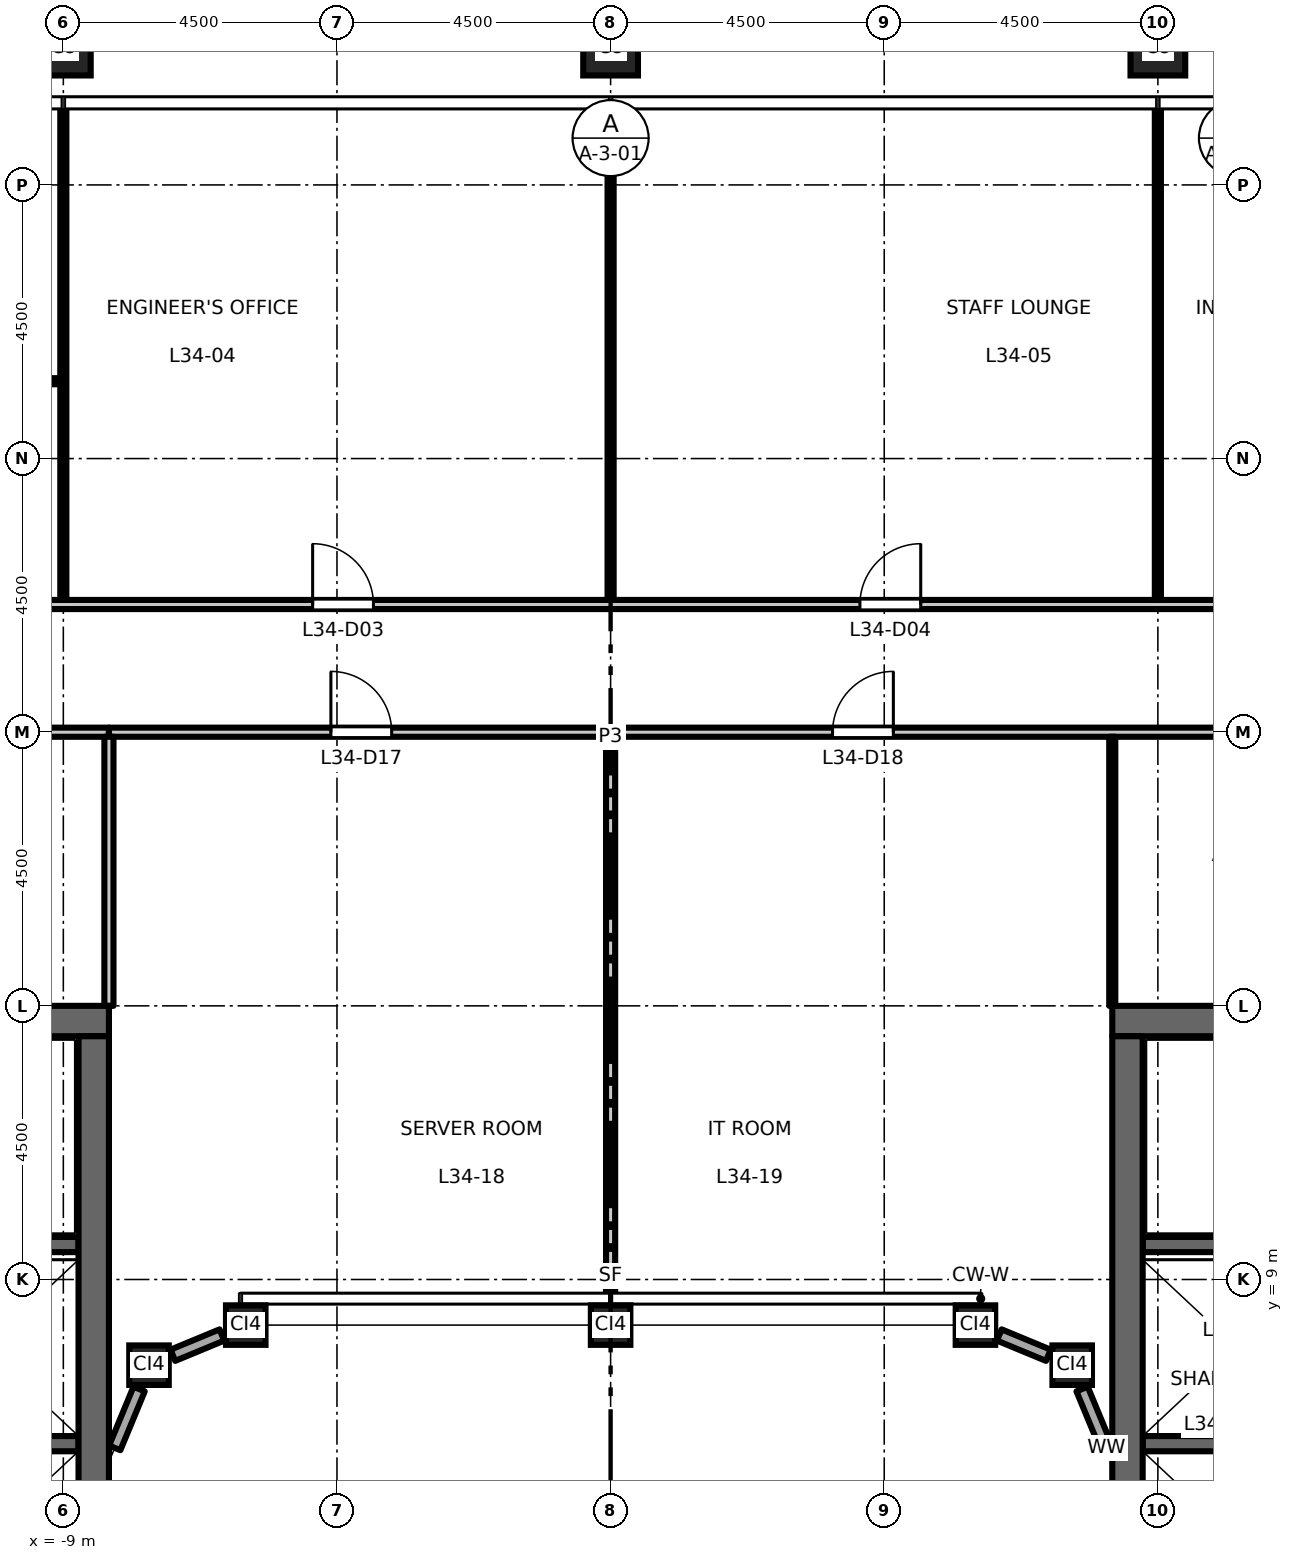
"""IFC4 building model, lengths in metres.
Left out: names, types, materials, properties, quantities, classifications, styles, units other than length and angle.
Written with IfcOpenShell. Run it as: python <this file> out.ifc"""

import sys

from ifc_helpers import new_model, si_unit, direction, frame, frame_2d, origin, origin_2d, place, context, subcontext, project, spatial, rectangle, hollow_rectangle, extrude, element, fill, save


model = new_model("IFC4")
c1 = context("Model", 3, precision=1e-05, world=origin(), true_north=direction((0.0, 1.0)))
c2 = subcontext(c1, "Body", "Model", "MODEL_VIEW")
j1 = project(units=[si_unit("LENGTHUNIT", "METRE"), si_unit("PLANEANGLEUNIT", "RADIAN")], contexts=[c1])
p1 = place(None, origin())
s1 = spatial("IfcSite", under=j1, at=p1, CompositionType="ELEMENT")
p2 = place(p1, origin())
s2 = spatial("IfcBuilding", under=s1, at=p2, CompositionType="ELEMENT")
p3 = place(p2, frame((0.0, 0.0, 158.7)))
s3 = spatial("IfcBuildingStorey", under=s2, at=p3, CompositionType="ELEMENT", Elevation=158.7)
for number, where, z_axis, x_axis in (
    (1, (9.0, 29.25, 0.0), (0.0, 0.0, 1.0), (1.0, 0.0, 0.0)),
    (2, (0.0, 29.25, 0.0), (0.0, 0.0, 1.0), (1.0, 0.0, 0.0)),
    (3, (-9.0, 29.25, 0.0), (0.0, 0.0, 1.0), (1.0, 0.0, 0.0)),
):
    element("IfcColumn", number, at=place(p3, frame(where, z_axis=z_axis, x_axis=x_axis)), inside=s3, PredefinedType="COLUMN", context=c2, shape_type="SweptSolid", body=[
        extrude(hollow_rectangle(XDim=0.9, YDim=0.9, WallThickness=0.05, at=origin_2d()), origin(), (0.0, 0.0, 1.0), 4.5),
    ])
for number, where, z_axis, x_axis in (
    (4, (-7.591, 7.591, 0.0), (0.0, 0.0, 1.0), (1.0, 0.0, 0.0)),
    (5, (-6.0, 8.25, 0.0), (0.0, 0.0, 1.0), (1.0, 0.0, 0.0)),
    (6, (0.0, 8.25, 0.0), (0.0, 0.0, 1.0), (1.0, 0.0, 0.0)),
    (7, (6.0, 8.25, 0.0), (0.0, 0.0, 1.0), (1.0, 0.0, 0.0)),
    (8, (7.591, 7.591, 0.0), (0.0, 0.0, 1.0), (1.0, 0.0, 0.0)),
):
    element("IfcColumn", number, at=place(p3, frame(where, z_axis=z_axis, x_axis=x_axis)), inside=s3, PredefinedType="COLUMN", context=c2, shape_type="SweptSolid", body=[
        extrude(hollow_rectangle(XDim=0.65, YDim=0.65, WallThickness=0.036, at=origin_2d()), origin(), (0.0, 0.0, 1.0), 4.5),
    ])
p4 = place(p3, frame((-8.75, 6.3, 0.0), z_axis=(0.0, 0.0, 1.0), x_axis=(-1.0, 0.0, 0.0)))
e9 = element("IfcWall", 9, at=p4, inside=s3, PredefinedType="SHEAR", context=c2, shape_type="SweptSolid", body=[
    extrude(rectangle(XDim=3.1, YDim=0.25, at=frame_2d((1.55, 0.0))), origin(), (0.0, 0.0, 1.0), 4.35),
])
p5 = place(p3, frame((-8.75, 9.575, 0.0), z_axis=(0.0, 0.0, 1.0), x_axis=(-1.0, 0.0, 0.0)))
e10 = element("IfcWall", 10, at=p5, inside=s3, PredefinedType="SHEAR", context=c2, shape_type="SweptSolid", body=[
    extrude(rectangle(XDim=8.0, YDim=0.25, at=frame_2d((4.0, 0.0))), origin(), (0.0, 0.0, 1.0), 4.35),
])
p6 = place(p5, frame((6.65, 0.0, 0.0)))
e11 = element("IfcOpeningElement", 11, at=p6, cuts=e10, PredefinedType="OPENING", context=c2, shape_type="SweptSolid", body=[
    extrude(rectangle(XDim=1.1, YDim=2.1, at=frame_2d((0.55, 1.05))), frame((0.0, 0.135, 0.0), z_axis=(0.0, -1.0, 0.0), x_axis=(1.0, 0.0, 0.0)), (0.0, 0.0, 1.0), 0.27),
])
p7 = place(p3, frame((-8.25, 13.25, 0.0), z_axis=(0.0, 0.0, 1.0), x_axis=(-1.0, 0.0, 0.0)))
e12 = element("IfcWall", 12, at=p7, inside=s3, PredefinedType="SHEAR", context=c2, shape_type="SweptSolid", body=[
    extrude(rectangle(XDim=13.5, YDim=0.5, at=frame_2d((6.75, 0.0))), origin(), (0.0, 0.0, 1.0), 4.35),
])
p8 = place(p3, frame((-8.5, -13.0, 0.0), z_axis=(0.0, 0.0, 1.0), x_axis=(0.0, 1.0, 0.0)))
e13 = element("IfcWall", 13, at=p8, inside=s3, PredefinedType="SHEAR", context=c2, shape_type="SweptSolid", body=[
    extrude(rectangle(XDim=26.0, YDim=0.5, at=frame_2d((13.0, 0.0))), origin(), (0.0, 0.0, 1.0), 4.35),
])
p9 = place(p3, frame((8.75, 6.3, 0.0), z_axis=(0.0, 0.0, 1.0), x_axis=(1.0, 0.0, 0.0)))
e14 = element("IfcWall", 14, at=p9, inside=s3, PredefinedType="SHEAR", context=c2, shape_type="SweptSolid", body=[
    extrude(rectangle(XDim=3.1, YDim=0.25, at=frame_2d((1.55, 0.0))), origin(), (0.0, 0.0, 1.0), 4.35),
])
p10 = place(p3, frame((8.75, 9.575, 0.0), z_axis=(0.0, 0.0, 1.0), x_axis=(1.0, 0.0, 0.0)))
e15 = element("IfcWall", 15, at=p10, inside=s3, PredefinedType="SHEAR", context=c2, shape_type="SweptSolid", body=[
    extrude(rectangle(XDim=8.0, YDim=0.25, at=frame_2d((4.0, 0.0))), origin(), (0.0, 0.0, 1.0), 4.35),
])
p11 = place(p10, frame((6.65, 0.0, 0.0)))
e16 = element("IfcOpeningElement", 16, at=p11, cuts=e15, PredefinedType="OPENING", context=c2, shape_type="SweptSolid", body=[
    extrude(rectangle(XDim=1.1, YDim=2.1, at=frame_2d((0.55, 1.05))), frame((0.0, 0.135, 0.0), z_axis=(0.0, -1.0, 0.0), x_axis=(1.0, 0.0, 0.0)), (0.0, 0.0, 1.0), 0.27),
])
p12 = place(p3, frame((8.25, 13.25, 0.0), z_axis=(0.0, 0.0, 1.0), x_axis=(1.0, 0.0, 0.0)))
e17 = element("IfcWall", 17, at=p12, inside=s3, PredefinedType="SHEAR", context=c2, shape_type="SweptSolid", body=[
    extrude(rectangle(XDim=13.5, YDim=0.5, at=frame_2d((6.75, 0.0))), origin(), (0.0, 0.0, 1.0), 4.35),
])
p13 = place(p3, frame((8.5, -13.0, 0.0), z_axis=(0.0, 0.0, 1.0), x_axis=(0.0, 1.0, 0.0)))
e18 = element("IfcWall", 18, at=p13, inside=s3, PredefinedType="SHEAR", context=c2, shape_type="SweptSolid", body=[
    extrude(rectangle(XDim=26.0, YDim=0.5, at=frame_2d((13.0, 0.0))), origin(), (0.0, 0.0, 1.0), 4.35),
])
p14 = place(p3, frame((8.154, 6.231, 0.0), z_axis=(0.0, 0.0, 1.0), x_axis=(-0.382694858887, 0.923874799408, 0.0)))
e19 = element("IfcWall", 19, at=p14, inside=s3, PredefinedType="STANDARD", context=c2, shape_type="SweptSolid", body=[
    extrude(rectangle(XDim=1.048, YDim=0.2, at=frame_2d((0.524, 0.0))), origin(), (0.0, 0.0, 1.0), 3.826),
])
for number, where, z_axis, x_axis in (
    (20, (7.199, 7.753, 0.0), (0.0, 0.0, 1.0), (-0.924, 0.383, 0.0)),
    (21, (-6.392, 8.087, 0.0), (0.0, 0.0, 1.0), (-0.924, -0.383, 0.0)),
):
    element("IfcWall", number, at=place(p3, frame(where, z_axis=z_axis, x_axis=x_axis)), inside=s3, PredefinedType="STANDARD", context=c2, shape_type="SweptSolid", body=[
        extrude(rectangle(XDim=0.873, YDim=0.2, at=frame_2d((0.437, 0.0))), origin(), (0.0, 0.0, 1.0), 3.826),
    ])
p15 = place(p3, frame((-7.753, 7.199, 0.0), z_axis=(0.0, 0.0, 1.0), x_axis=(-0.382694858887, -0.923874799408, 0.0)))
e22 = element("IfcWall", 22, at=p15, inside=s3, PredefinedType="STANDARD", context=c2, shape_type="SweptSolid", body=[
    extrude(rectangle(XDim=1.048, YDim=0.2, at=frame_2d((0.524, 0.0))), origin(), (0.0, 0.0, 1.0), 3.826),
])
p16 = place(p3, frame((-21.825, 18.0, 0.0), z_axis=(0.0, 0.0, 1.0), x_axis=(1.0, 0.0, 0.0)))
e23 = element("IfcWall", 23, at=p16, inside=s3, PredefinedType="PARTITIONING", context=c2, shape_type="SweptSolid", body=[
    extrude(rectangle(XDim=13.575, YDim=0.15, at=frame_2d((6.788, 0.0))), origin(), (0.0, 0.0, 1.0), 4.35),
])
p17 = place(p16, frame((6.225, 0.0, 0.0)))
e24 = element("IfcOpeningElement", 24, at=p17, cuts=e23, PredefinedType="OPENING", context=c2, shape_type="SweptSolid", body=[
    extrude(rectangle(XDim=1.0, YDim=2.1, at=frame_2d((0.5, 1.05))), frame((0.0, 0.085, 0.0), z_axis=(0.0, -1.0, 0.0), x_axis=(1.0, 0.0, 0.0)), (0.0, 0.0, 1.0), 0.17),
])
p18 = place(p3, frame((0.0, 18.0, 0.0), z_axis=(0.0, 0.0, 1.0), x_axis=(1.0, 0.0, 0.0)))
e25 = element("IfcWall", 25, at=p18, inside=s3, PredefinedType="PARTITIONING", context=c2, shape_type="SweptSolid", body=[
    extrude(rectangle(XDim=21.825, YDim=0.15, at=frame_2d((10.913, 0.0))), origin(), (0.0, 0.0, 1.0), 4.35),
])
p19 = place(p18, frame((3.65, 0.0, 0.0)))
e26 = element("IfcOpeningElement", 26, at=p19, cuts=e25, PredefinedType="OPENING", context=c2, shape_type="SweptSolid", body=[
    extrude(rectangle(XDim=1.0, YDim=2.1, at=frame_2d((0.5, 1.05))), frame((0.0, 0.085, 0.0), z_axis=(0.0, -1.0, 0.0), x_axis=(1.0, 0.0, 0.0)), (0.0, 0.0, 1.0), 0.17),
])
p20 = place(p18, frame((14.4, 0.0, 0.0)))
e27 = element("IfcOpeningElement", 27, at=p20, cuts=e25, PredefinedType="OPENING", context=c2, shape_type="SweptSolid", body=[
    extrude(rectangle(XDim=1.0, YDim=2.1, at=frame_2d((0.5, 1.05))), frame((0.0, 0.085, 0.0), z_axis=(0.0, -1.0, 0.0), x_axis=(1.0, 0.0, 0.0)), (0.0, 0.0, 1.0), 0.17),
])
p21 = place(p3, frame((-8.25, 18.0, 0.0), z_axis=(0.0, 0.0, 1.0), x_axis=(1.0, 0.0, 0.0)))
e28 = element("IfcWall", 28, at=p21, inside=s3, PredefinedType="PARTITIONING", context=c2, shape_type="SweptSolid", body=[
    extrude(rectangle(XDim=8.25, YDim=0.15, at=frame_2d((4.125, 0.0))), origin(), (0.0, 0.0, 1.0), 4.35),
])
p22 = place(p21, frame((3.65, 0.0, 0.0)))
e29 = element("IfcOpeningElement", 29, at=p22, cuts=e28, PredefinedType="OPENING", context=c2, shape_type="SweptSolid", body=[
    extrude(rectangle(XDim=1.0, YDim=2.1, at=frame_2d((0.5, 1.05))), frame((0.0, 0.085, 0.0), z_axis=(0.0, -1.0, 0.0), x_axis=(1.0, 0.0, 0.0)), (0.0, 0.0, 1.0), 0.17),
])
p23 = place(p3, frame((-27.308, 20.1, 0.0), z_axis=(0.0, 0.0, 1.0), x_axis=(1.0, 0.0, 0.0)))
e30 = element("IfcWall", 30, at=p23, inside=s3, PredefinedType="PARTITIONING", context=c2, shape_type="SweptSolid", body=[
    extrude(rectangle(XDim=54.616, YDim=0.15, at=frame_2d((27.308, 0.0))), origin(), (0.0, 0.0, 1.0), 4.35),
])
p24 = place(p23, frame((13.408, 0.0, 0.0)))
e31 = element("IfcOpeningElement", 31, at=p24, cuts=e30, PredefinedType="OPENING", context=c2, shape_type="SweptSolid", body=[
    extrude(rectangle(XDim=1.0, YDim=2.1, at=frame_2d((0.5, 1.05))), frame((0.0, 0.085, 0.0), z_axis=(0.0, -1.0, 0.0), x_axis=(1.0, 0.0, 0.0)), (0.0, 0.0, 1.0), 0.17),
])
p25 = place(p23, frame((22.408, 0.0, 0.0)))
e32 = element("IfcOpeningElement", 32, at=p25, cuts=e30, PredefinedType="OPENING", context=c2, shape_type="SweptSolid", body=[
    extrude(rectangle(XDim=1.0, YDim=2.1, at=frame_2d((0.5, 1.05))), frame((0.0, 0.085, 0.0), z_axis=(0.0, -1.0, 0.0), x_axis=(1.0, 0.0, 0.0)), (0.0, 0.0, 1.0), 0.17),
])
p26 = place(p23, frame((31.408, 0.0, 0.0)))
e33 = element("IfcOpeningElement", 33, at=p26, cuts=e30, PredefinedType="OPENING", context=c2, shape_type="SweptSolid", body=[
    extrude(rectangle(XDim=1.0, YDim=2.1, at=frame_2d((0.5, 1.05))), frame((0.0, 0.085, 0.0), z_axis=(0.0, -1.0, 0.0), x_axis=(1.0, 0.0, 0.0)), (0.0, 0.0, 1.0), 0.17),
])
p27 = place(p23, frame((40.408, 0.0, 0.0)))
e34 = element("IfcOpeningElement", 34, at=p27, cuts=e30, PredefinedType="OPENING", context=c2, shape_type="SweptSolid", body=[
    extrude(rectangle(XDim=1.0, YDim=2.1, at=frame_2d((0.5, 1.05))), frame((0.0, 0.085, 0.0), z_axis=(0.0, -1.0, 0.0), x_axis=(1.0, 0.0, 0.0)), (0.0, 0.0, 1.0), 0.17),
])
p28 = place(p23, frame((4.158, 0.0, 0.0)))
e35 = element("IfcOpeningElement", 35, at=p28, cuts=e30, PredefinedType="OPENING", context=c2, shape_type="SweptSolid", body=[
    extrude(rectangle(XDim=1.0, YDim=2.1, at=frame_2d((0.5, 1.05))), frame((0.0, 0.085, 0.0), z_axis=(0.0, -1.0, 0.0), x_axis=(1.0, 0.0, 0.0)), (0.0, 0.0, 1.0), 0.17),
])
p29 = place(p23, frame((49.466, 0.0, 0.0)))
e36 = element("IfcOpeningElement", 36, at=p29, cuts=e30, PredefinedType="OPENING", context=c2, shape_type="SweptSolid", body=[
    extrude(rectangle(XDim=1.0, YDim=2.1, at=frame_2d((0.5, 1.05))), frame((0.0, 0.085, 0.0), z_axis=(0.0, -1.0, 0.0), x_axis=(1.0, 0.0, 0.0)), (0.0, 0.0, 1.0), 0.17),
])
p30 = place(p3, frame((-17.95, 23.772, 0.0), z_axis=(0.0, 0.0, 1.0), x_axis=(1.0, 0.0, 0.0)))
e37 = element("IfcWall", 37, at=p30, inside=s3, PredefinedType="PARTITIONING", context=c2, shape_type="SweptSolid", body=[
    extrude(rectangle(XDim=8.9, YDim=0.1, at=frame_2d((4.45, 0.0))), origin(), (0.0, 0.0, 1.0), 4.35),
])
p31 = place(p30, frame((4.05, 0.0, 0.0)))
e38 = element("IfcOpeningElement", 38, at=p31, cuts=e37, PredefinedType="OPENING", context=c2, shape_type="SweptSolid", body=[
    extrude(rectangle(XDim=1.0, YDim=2.1, at=frame_2d((0.5, 1.05))), frame((0.0, 0.06, 0.0), z_axis=(0.0, -1.0, 0.0), x_axis=(1.0, 0.0, 0.0)), (0.0, 0.0, 1.0), 0.12),
])
p32 = place(p3, frame((-9.0, 20.175, 0.0), z_axis=(0.0, 0.0, 1.0), x_axis=(0.0, 1.0, 0.0)))
e39 = element("IfcWall", 39, at=p32, inside=s3, PredefinedType="PARTITIONING", context=c2, shape_type="SweptSolid", body=[
    extrude(rectangle(XDim=8.085, YDim=0.1, at=frame_2d((4.042, 0.0))), origin(), (0.0, 0.0, 1.0), 3.45),
])
p33 = place(p3, frame((-8.25, 13.5, 0.0), z_axis=(0.0, 0.0, 1.0), x_axis=(0.0, 1.0, 0.0)))
e40 = element("IfcWall", 40, at=p33, inside=s3, PredefinedType="PARTITIONING", context=c2, shape_type="SweptSolid", body=[
    extrude(rectangle(XDim=4.425, YDim=0.15, at=frame_2d((2.212, 0.0))), origin(), (0.0, 0.0, 1.0), 4.35),
])
p34 = place(p3, frame((0.0, 20.175, 0.0), z_axis=(0.0, 0.0, 1.0), x_axis=(0.0, 1.0, 0.0)))
e41 = element("IfcWall", 41, at=p34, inside=s3, PredefinedType="PARTITIONING", context=c2, shape_type="SweptSolid", body=[
    extrude(rectangle(XDim=8.085, YDim=0.1, at=frame_2d((4.042, 0.0))), origin(), (0.0, 0.0, 1.0), 3.45),
])
p35 = place(p3, frame((0.0, 8.65, 0.0), z_axis=(0.0, 0.0, 1.0), x_axis=(0.0, 1.0, 0.0)))
e42 = element("IfcWall", 42, at=p35, inside=s3, PredefinedType="PARTITIONING", context=c2, shape_type="SweptSolid", body=[
    extrude(rectangle(XDim=9.275, YDim=0.15, at=frame_2d((4.638, 0.0))), origin(), (0.0, 0.0, 1.0), 3.45),
])
p36 = place(p3, frame((8.25, 13.5, 0.0), z_axis=(0.0, 0.0, 1.0), x_axis=(0.0, 1.0, 0.0)))
e43 = element("IfcWall", 43, at=p36, inside=s3, PredefinedType="PARTITIONING", context=c2, shape_type="SweptSolid", body=[
    extrude(rectangle(XDim=4.425, YDim=0.1, at=frame_2d((2.212, 0.0))), origin(), (0.0, 0.0, 1.0), 4.35),
])
p37 = place(p3, frame((9.0, 20.175, 0.0), z_axis=(0.0, 0.0, 1.0), x_axis=(0.0, 1.0, 0.0)))
e44 = element("IfcWall", 44, at=p37, inside=s3, PredefinedType="PARTITIONING", context=c2, shape_type="SweptSolid", body=[
    extrude(rectangle(XDim=8.085, YDim=0.1, at=frame_2d((4.042, 0.0))), origin(), (0.0, 0.0, 1.0), 3.45),
])
p38 = place(p25, origin())
e45 = element("IfcDoor", 45, at=p38, inside=s3, OperationType="SINGLE_SWING_LEFT", PredefinedType="DOOR", context=c2, shape_type="SweptSolid", body=[
    extrude(rectangle(XDim=1.0, YDim=2.1, at=frame_2d((0.5, 1.05))), frame((0.0, 0.025, 0.0), z_axis=(0.0, -1.0, 0.0), x_axis=(1.0, 0.0, 0.0)), (0.0, 0.0, 1.0), 0.05),
])
fill(e32, e45)
p39 = place(p26, origin())
e46 = element("IfcDoor", 46, at=p39, inside=s3, OperationType="SINGLE_SWING_RIGHT", PredefinedType="DOOR", context=c2, shape_type="SweptSolid", body=[
    extrude(rectangle(XDim=1.0, YDim=2.1, at=frame_2d((0.5, 1.05))), frame((0.0, 0.025, 0.0), z_axis=(0.0, -1.0, 0.0), x_axis=(1.0, 0.0, 0.0)), (0.0, 0.0, 1.0), 0.05),
])
fill(e33, e46)
p40 = place(p22, origin())
e47 = element("IfcDoor", 47, at=p40, inside=s3, OperationType="SINGLE_SWING_LEFT", PredefinedType="DOOR", context=c2, shape_type="SweptSolid", body=[
    extrude(rectangle(XDim=1.0, YDim=2.1, at=frame_2d((0.5, 1.05))), frame((0.0, 0.025, 0.0), z_axis=(0.0, -1.0, 0.0), x_axis=(1.0, 0.0, 0.0)), (0.0, 0.0, 1.0), 0.05),
])
fill(e29, e47)
p41 = place(p19, origin())
e48 = element("IfcDoor", 48, at=p41, inside=s3, OperationType="SINGLE_SWING_RIGHT", PredefinedType="DOOR", context=c2, shape_type="SweptSolid", body=[
    extrude(rectangle(XDim=1.0, YDim=2.1, at=frame_2d((0.5, 1.05))), frame((0.0, 0.025, 0.0), z_axis=(0.0, -1.0, 0.0), x_axis=(1.0, 0.0, 0.0)), (0.0, 0.0, 1.0), 0.05),
])
fill(e26, e48)
save(model, sys.argv[1])
